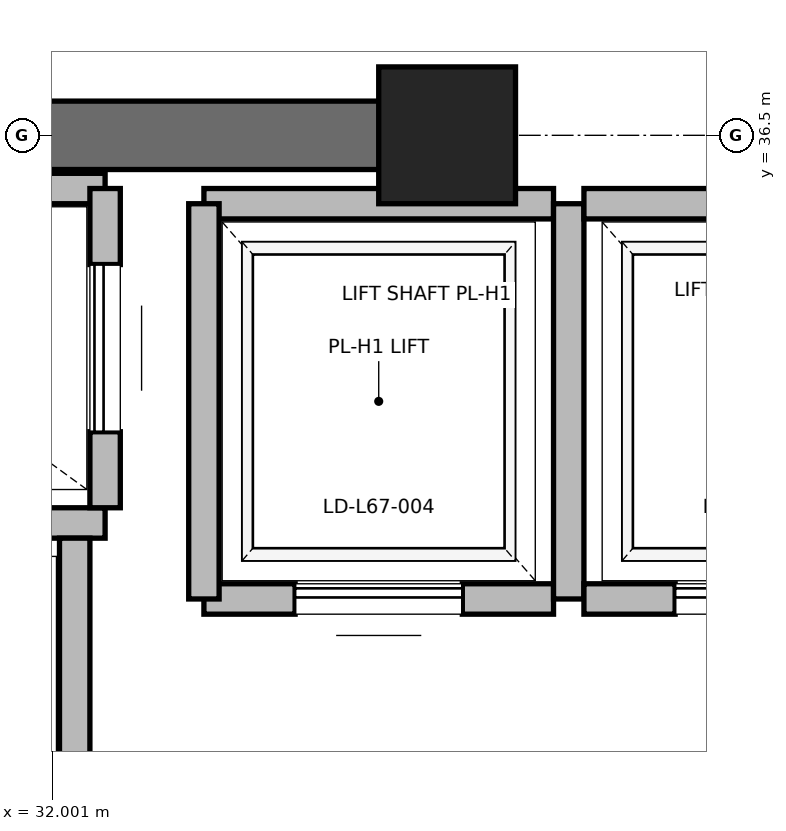
"""IFC4 building model, lengths in metres.
Left out: names, types, materials, properties, quantities, classifications, styles, units other than length and angle.
Written with IfcOpenShell. Run it as: python <this file> out.ifc"""

import sys

from ifc_helpers import new_model, si_unit, direction, frame, frame_2d, origin, origin_2d, place, context, subcontext, project, spatial, rectangle, extrude, element, fill, save


model = new_model("IFC4")
c1 = context("Model", 3, precision=1e-05, world=origin(), true_north=direction((0.0, 1.0)))
c2 = subcontext(c1, "Body", "Model", "MODEL_VIEW")
j1 = project(units=[si_unit("LENGTHUNIT", "METRE"), si_unit("PLANEANGLEUNIT", "RADIAN")], contexts=[c1])
p1 = place(None, origin())
s1 = spatial("IfcSite", under=j1, at=p1, CompositionType="ELEMENT")
p2 = place(p1, origin())
s2 = spatial("IfcBuilding", under=s1, at=p2, CompositionType="ELEMENT")
p3 = place(p2, frame((0.0, 0.0, 287.2)))
s3 = spatial("IfcBuildingStorey", under=s2, at=p3, CompositionType="ELEMENT", Elevation=287.2)
p4 = place(p3, frame((34.6, 36.5, 0.0), z_axis=(0.0, 0.0, 1.0), x_axis=(1.0, 0.0, 0.0)))
e1 = element("IfcColumn", 1, at=p4, inside=s3, PredefinedType="PILASTER", context=c2, shape_type="SweptSolid", body=[
    extrude(rectangle(XDim=0.9, YDim=0.9, at=origin_2d()), origin(), (0.0, 0.0, 1.0), 4.0),
])
p5 = place(p3, frame((29.0, 36.5, 0.0), z_axis=(0.0, 0.0, 1.0), x_axis=(1.0, 0.0, 0.0)))
e2 = element("IfcWall", 2, at=p5, inside=s3, PredefinedType="SHEAR", context=c2, shape_type="SweptSolid", body=[
    extrude(rectangle(XDim=5.8, YDim=0.45, at=frame_2d((2.9, 0.0))), origin(), (0.0, 0.0, 1.0), 3.785),
])
p6 = place(p3, frame((29.55, 33.95, 0.0), z_axis=(0.0, 0.0, 1.0), x_axis=(1.0, 0.0, 0.0)))
e3 = element("IfcWall", 3, at=p6, inside=s3, PredefinedType="SOLIDWALL", context=c2, shape_type="SweptSolid", body=[
    extrude(rectangle(XDim=2.8, YDim=0.2, at=frame_2d((1.4, 0.0))), origin(), (0.0, 0.0, 1.0), 3.785),
])
p7 = place(p3, frame((32.15, 30.85, 0.0), z_axis=(0.0, 0.0, 1.0), x_axis=(0.0, 1.0, 0.0)))
e4 = element("IfcWall", 4, at=p7, inside=s3, PredefinedType="SOLIDWALL", context=c2, shape_type="SweptSolid", body=[
    extrude(rectangle(XDim=3.0, YDim=0.2, at=frame_2d((1.5, 0.0))), origin(), (0.0, 0.0, 1.0), 3.785),
])
p8 = place(p3, frame((32.35, 36.15, 0.0), z_axis=(0.0, 0.0, 1.0), x_axis=(-1.0, 0.0, 0.0)))
e5 = element("IfcWall", 5, at=p8, inside=s3, PredefinedType="SOLIDWALL", context=c2, shape_type="SweptSolid", body=[
    extrude(rectangle(XDim=2.8, YDim=0.2, at=frame_2d((1.4, 0.0))), origin(), (0.0, 0.0, 1.0), 3.148),
])
p9 = place(p3, frame((32.35, 34.05, 0.0), z_axis=(0.0, 0.0, 1.0), x_axis=(0.0, 1.0, 0.0)))
e6 = element("IfcWall", 6, at=p9, inside=s3, PredefinedType="SOLIDWALL", context=c2, shape_type="SweptSolid", body=[
    extrude(rectangle(XDim=2.1, YDim=0.2, at=frame_2d((1.05, 0.0))), origin(), (0.0, 0.0, 1.0), 3.785),
])
p10 = place(p9, frame((0.5, 0.0, 0.0)))
e7 = element("IfcOpeningElement", 7, at=p10, cuts=e6, PredefinedType="OPENING", context=c2, shape_type="SweptSolid", body=[
    extrude(rectangle(XDim=1.1, YDim=2.2, at=frame_2d((0.55, 1.1))), frame((0.0, 0.1, 0.0), z_axis=(0.0, -1.0, 0.0), x_axis=(1.0, 0.0, 0.0)), (0.0, 0.0, 1.0), 0.2),
])
p11 = place(p3, frame((33.0, 33.45, 0.0), z_axis=(0.0, 0.0, 1.0), x_axis=(1.0, 0.0, 0.0)))
e8 = element("IfcWall", 8, at=p11, inside=s3, PredefinedType="SOLIDWALL", context=c2, shape_type="SweptSolid", body=[
    extrude(rectangle(XDim=2.3, YDim=0.2, at=frame_2d((1.15, 0.0))), origin(), (0.0, 0.0, 1.0), 3.785),
])
p12 = place(p11, frame((0.6, 0.0, 0.0)))
e9 = element("IfcOpeningElement", 9, at=p12, cuts=e8, PredefinedType="OPENING", context=c2, shape_type="SweptSolid", body=[
    extrude(rectangle(XDim=1.1, YDim=2.2, at=frame_2d((0.55, 1.1))), frame((0.0, 0.1, 0.0), z_axis=(0.0, -1.0, 0.0), x_axis=(1.0, 0.0, 0.0)), (0.0, 0.0, 1.0), 0.2),
])
p13 = place(p3, frame((35.3, 36.05, 0.0), z_axis=(0.0, 0.0, 1.0), x_axis=(-1.0, 0.0, 0.0)))
e10 = element("IfcWall", 10, at=p13, inside=s3, PredefinedType="SOLIDWALL", context=c2, shape_type="SweptSolid", body=[
    extrude(rectangle(XDim=2.3, YDim=0.2, at=frame_2d((1.15, 0.0))), origin(), (0.0, 0.0, 1.0), 2.865),
])
p14 = place(p3, frame((33.0, 36.05, 0.0), z_axis=(0.0, 0.0, 1.0), x_axis=(0.0, -1.0, 0.0)))
e11 = element("IfcWall", 11, at=p14, inside=s3, PredefinedType="SOLIDWALL", context=c2, shape_type="SweptSolid", body=[
    extrude(rectangle(XDim=2.6, YDim=0.2, at=frame_2d((1.3, 0.0))), origin(), (0.0, 0.0, 1.0), 3.785),
])
p15 = place(p3, frame((35.4, 33.45, 0.0), z_axis=(0.0, 0.0, 1.0), x_axis=(0.0, 1.0, 0.0)))
e12 = element("IfcWall", 12, at=p15, inside=s3, PredefinedType="SOLIDWALL", context=c2, shape_type="SweptSolid", body=[
    extrude(rectangle(XDim=2.6, YDim=0.2, at=frame_2d((1.3, 0.0))), origin(), (0.0, 0.0, 1.0), 2.865),
])
p16 = place(p3, frame((35.5, 33.45, 0.0), z_axis=(0.0, 0.0, 1.0), x_axis=(1.0, 0.0, 0.0)))
e13 = element("IfcWall", 13, at=p16, inside=s3, PredefinedType="SOLIDWALL", context=c2, shape_type="SweptSolid", body=[
    extrude(rectangle(XDim=2.3, YDim=0.2, at=frame_2d((1.15, 0.0))), origin(), (0.0, 0.0, 1.0), 3.785),
])
p17 = place(p16, frame((0.6, 0.0, 0.0)))
e14 = element("IfcOpeningElement", 14, at=p17, cuts=e13, PredefinedType="OPENING", context=c2, shape_type="SweptSolid", body=[
    extrude(rectangle(XDim=1.1, YDim=2.2, at=frame_2d((0.55, 1.1))), frame((0.0, 0.1, 0.0), z_axis=(0.0, -1.0, 0.0), x_axis=(1.0, 0.0, 0.0)), (0.0, 0.0, 1.0), 0.2),
])
p18 = place(p3, frame((37.8, 36.05, 0.0), z_axis=(0.0, 0.0, 1.0), x_axis=(-1.0, 0.0, 0.0)))
e15 = element("IfcWall", 15, at=p18, inside=s3, PredefinedType="SOLIDWALL", context=c2, shape_type="SweptSolid", body=[
    extrude(rectangle(XDim=2.3, YDim=0.2, at=frame_2d((1.15, 0.0))), origin(), (0.0, 0.0, 1.0), 2.865),
])
p19 = place(p10, origin())
e16 = element("IfcDoor", 16, at=p19, inside=s3, OperationType="SLIDING_TO_RIGHT", PredefinedType="DOOR", context=c2, shape_type="SweptSolid", body=[
    extrude(rectangle(XDim=1.1, YDim=2.2, at=frame_2d((0.55, 1.1))), frame((0.0, 0.025, 0.0), z_axis=(0.0, -1.0, 0.0), x_axis=(1.0, 0.0, 0.0)), (0.0, 0.0, 1.0), 0.05),
])
fill(e7, e16)
p20 = place(p12, origin())
e17 = element("IfcDoor", 17, at=p20, inside=s3, OperationType="SLIDING_TO_RIGHT", PredefinedType="DOOR", context=c2, shape_type="SweptSolid", body=[
    extrude(rectangle(XDim=1.1, YDim=2.2, at=frame_2d((0.55, 1.1))), frame((0.0, 0.025, 0.0), z_axis=(0.0, -1.0, 0.0), x_axis=(1.0, 0.0, 0.0)), (0.0, 0.0, 1.0), 0.05),
])
fill(e9, e17)
p21 = place(p17, origin())
e18 = element("IfcDoor", 18, at=p21, inside=s3, OperationType="SLIDING_TO_RIGHT", PredefinedType="DOOR", context=c2, shape_type="SweptSolid", body=[
    extrude(rectangle(XDim=1.1, YDim=2.2, at=frame_2d((0.55, 1.1))), frame((0.0, 0.025, 0.0), z_axis=(0.0, -1.0, 0.0), x_axis=(1.0, 0.0, 0.0)), (0.0, 0.0, 1.0), 0.05),
])
fill(e14, e18)
save(model, sys.argv[1])
